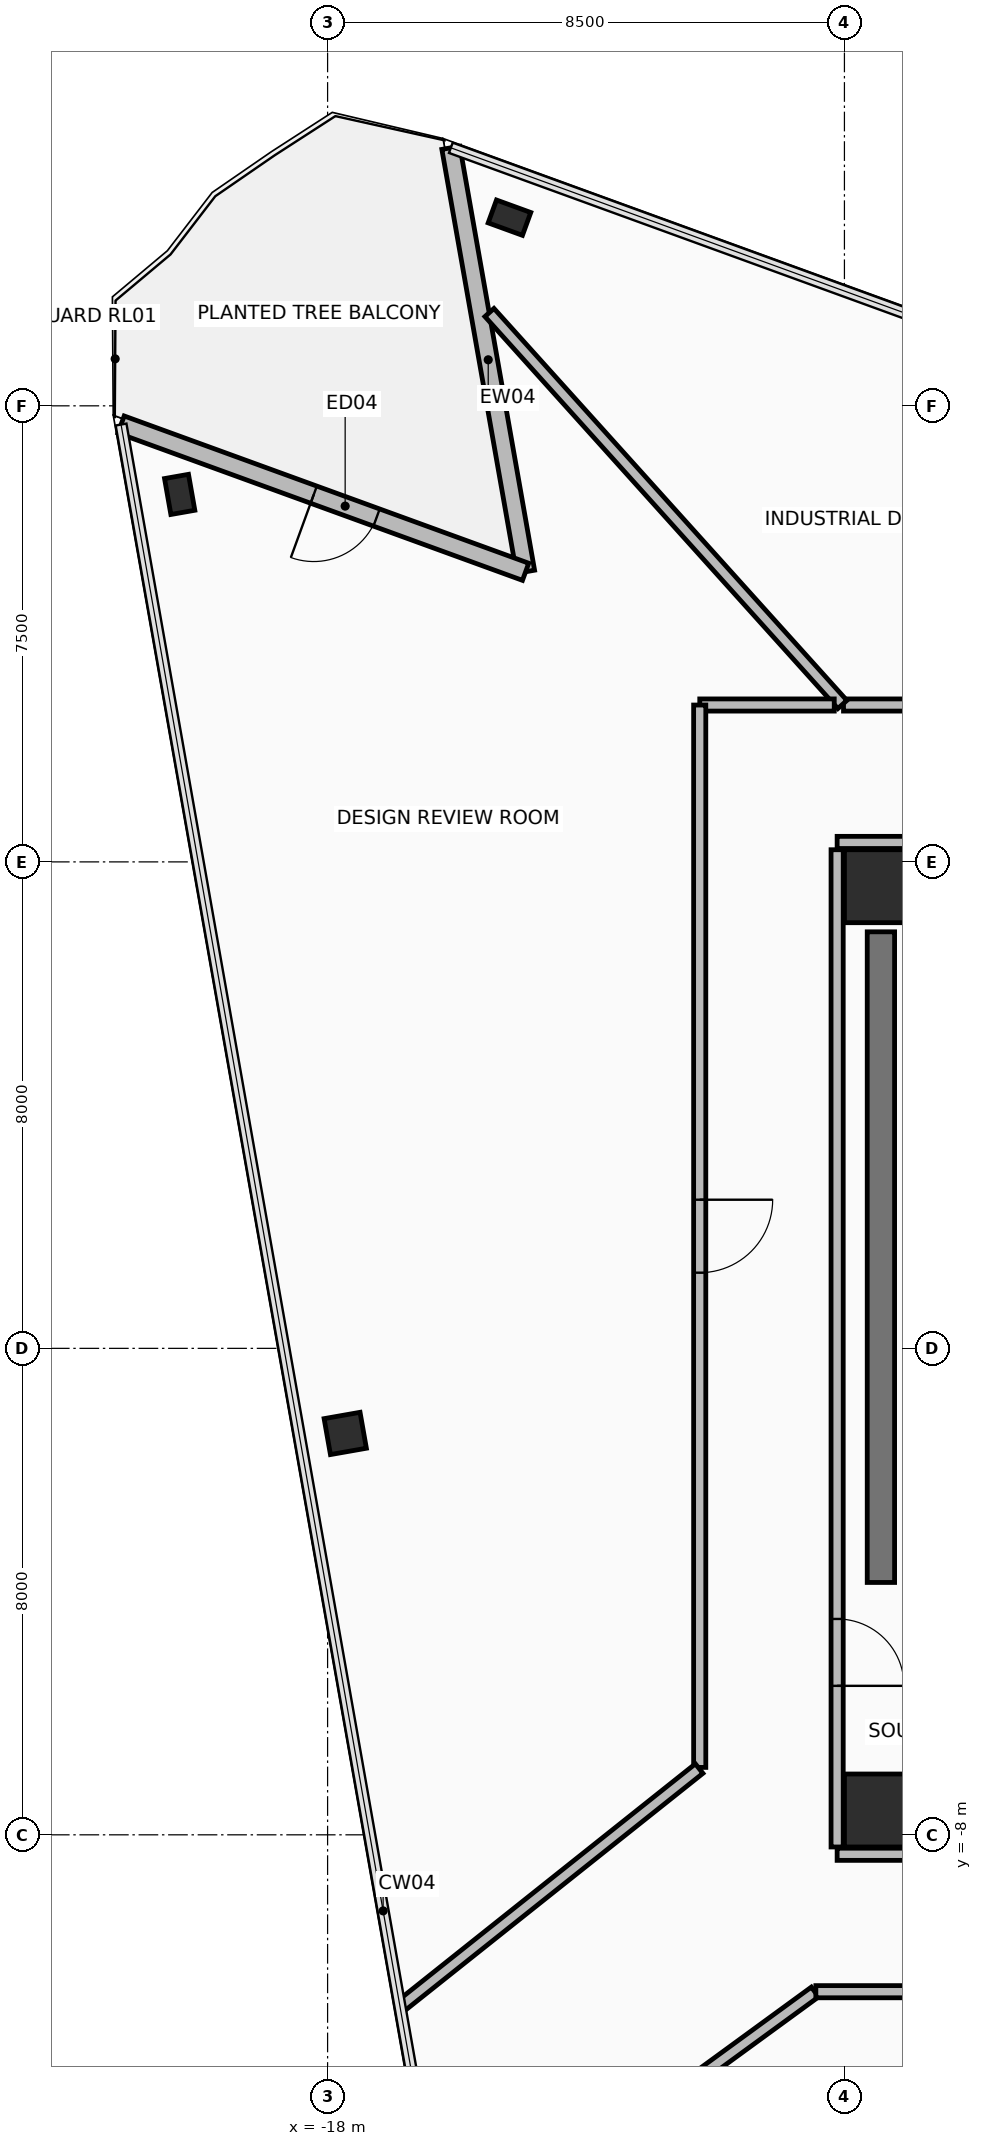
"""IFC4 building model, lengths in metres.
Left out: names, types, materials, properties, quantities, classifications, styles, units other than length and angle.
Written with IfcOpenShell. Run it as: python <this file> out.ifc"""

import sys

from ifc_helpers import new_model, si_unit, direction, frame, frame_2d, origin, origin_2d, place, context, subcontext, project, spatial, rectangle, hollow_rectangle, extrude, element, fill, save


model = new_model("IFC4")
c1 = context("Model", 3, precision=1e-05, world=origin(), true_north=direction((0.0, 1.0)))
c2 = subcontext(c1, "Body", "Model", "MODEL_VIEW")
j1 = project(units=[si_unit("LENGTHUNIT", "METRE"), si_unit("PLANEANGLEUNIT", "RADIAN")], contexts=[c1])
p1 = place(None, origin())
s1 = spatial("IfcSite", under=j1, at=p1, CompositionType="ELEMENT")
p2 = place(p1, origin())
s2 = spatial("IfcBuilding", under=s1, at=p2, CompositionType="ELEMENT")
p3 = place(p2, frame((0.0, 0.0, 192.1)))
s3 = spatial("IfcBuildingStorey", under=s2, at=p3, CompositionType="ELEMENT", Elevation=192.1)
for number, where, z_axis, x_axis in (
    (1, (-8.9, -7.6, 0.0), (0.0, 0.0, 1.0), (1.0, 0.0, 0.0)),
    (2, (-8.9, 7.6, 0.0), (0.0, 0.0, 1.0), (1.0, 0.0, 0.0)),
):
    element("IfcColumn", number, at=place(p3, frame(where, z_axis=z_axis, x_axis=x_axis)), inside=s3, PredefinedType="COLUMN", context=c2, shape_type="SweptSolid", body=[
        extrude(rectangle(XDim=1.2, YDim=1.2, at=origin_2d()), origin(), (0.0, 0.0, 1.0), 4.75),
    ])
p4 = place(p3, frame((-20.433, 14.043, 0.0), z_axis=(0.0, 0.0, 1.0), x_axis=(-0.173648177667, 0.984807753012, 0.0)))
e3 = element("IfcColumn", 3, at=p4, inside=s3, PredefinedType="COLUMN", context=c2, shape_type="SweptSolid", body=[
    extrude(hollow_rectangle(XDim=0.4, YDim=0.6, WallThickness=0.03, at=origin_2d()), origin(), (0.0, 0.0, 1.0), 4.75),
])
p5 = place(p3, frame((-17.71, -1.399, 0.0), z_axis=(0.0, 0.0, 1.0), x_axis=(-0.173648177667, 0.984807753012, 0.0)))
e4 = element("IfcColumn", 4, at=p5, inside=s3, PredefinedType="COLUMN", context=c2, shape_type="SweptSolid", body=[
    extrude(hollow_rectangle(XDim=0.6, YDim=0.6, WallThickness=0.036, at=origin_2d()), origin(), (0.0, 0.0, 1.0), 4.75),
])
p6 = place(p3, frame((-15.009, 18.594, 0.0), z_axis=(0.0, 0.0, 1.0), x_axis=(-0.939692023847, 0.342021783398, 0.0)))
e5 = element("IfcColumn", 5, at=p6, inside=s3, PredefinedType="COLUMN", context=c2, shape_type="SweptSolid", body=[
    extrude(hollow_rectangle(XDim=0.4, YDim=0.6, WallThickness=0.03, at=origin_2d()), origin(), (0.0, 0.0, 1.0), 4.75),
])
p7 = place(p3, frame((-15.973, 19.743, 0.0), z_axis=(0.0, 0.0, 1.0), x_axis=(0.173651569749, -0.984807154891, 0.0)))
e6 = element("IfcWall", 6, at=p7, inside=s3, PredefinedType="STANDARD", context=c2, shape_type="SweptSolid", body=[
    extrude(rectangle(XDim=7.08, YDim=0.3, at=frame_2d((3.54, 0.0))), origin(), (0.0, 0.0, 1.0), 2.255),
])
p8 = place(p3, frame((-14.744, 12.771, 0.0), z_axis=(0.0, 0.0, 1.0), x_axis=(-0.939687665182, 0.342033758429, 0.0)))
e7 = element("IfcWall", 7, at=p8, inside=s3, PredefinedType="STANDARD", context=c2, shape_type="SweptSolid", body=[
    extrude(rectangle(XDim=7.08, YDim=0.3, at=frame_2d((3.54, 0.0))), origin(), (0.0, 0.0, 1.0), 2.255),
])
p9 = place(p8, frame((2.608, 0.0, 0.0)))
e8 = element("IfcOpeningElement", 8, at=p9, cuts=e7, PredefinedType="OPENING", context=c2, shape_type="SweptSolid", body=[
    extrude(rectangle(XDim=1.1, YDim=2.2, at=frame_2d((0.55, 1.1))), frame((0.0, 0.16, 0.0), z_axis=(0.0, -1.0, 0.0), x_axis=(1.0, 0.0, 0.0)), (0.0, 0.0, 1.0), 0.32),
])
p10 = place(p3, frame((-8.9, -3.85, 0.0), z_axis=(0.0, 0.0, 1.0), x_axis=(0.0, 1.0, 0.0)))
e9 = element("IfcWall", 9, at=p10, inside=s3, PredefinedType="SHEAR", context=c2, shape_type="SweptSolid", body=[
    extrude(rectangle(XDim=10.7, YDim=0.45, at=frame_2d((5.35, 0.0))), origin(), (0.0, 0.0, 1.0), 4.56),
])
p11 = place(p3, frame((-9.62, -8.32, 0.0), z_axis=(0.0, 0.0, 1.0), x_axis=(1.0, 0.0, 0.0)))
e10 = element("IfcWall", 10, at=p11, inside=s3, PredefinedType="PARTITIONING", context=c2, shape_type="SweptSolid", body=[
    extrude(rectangle(XDim=19.24, YDim=0.2, at=frame_2d((9.62, 0.0))), origin(), (0.0, 0.0, 1.0), 2.355),
])
p12 = place(p11, frame((8.57, 0.0, 0.0)))
e11 = element("IfcOpeningElement", 11, at=p12, cuts=e10, PredefinedType="OPENING", context=c2, shape_type="SweptSolid", body=[
    extrude(rectangle(XDim=0.9, YDim=2.1, at=frame_2d((0.45, 1.05))), frame((0.0, 0.11, 0.0), z_axis=(0.0, -1.0, 0.0), x_axis=(1.0, 0.0, 0.0)), (0.0, 0.0, 1.0), 0.22),
])
p13 = place(p11, frame((14.045, 0.0, 0.0)))
e12 = element("IfcOpeningElement", 12, at=p13, cuts=e10, PredefinedType="OPENING", context=c2, shape_type="SweptSolid", body=[
    extrude(rectangle(XDim=0.9, YDim=2.1, at=frame_2d((0.45, 1.05))), frame((0.0, 0.11, 0.0), z_axis=(0.0, -1.0, 0.0), x_axis=(1.0, 0.0, 0.0)), (0.0, 0.0, 1.0), 0.22),
])
p14 = place(p11, frame((15.995, 0.0, 0.0)))
e13 = element("IfcOpeningElement", 13, at=p14, cuts=e10, PredefinedType="OPENING", context=c2, shape_type="SweptSolid", body=[
    extrude(rectangle(XDim=0.9, YDim=2.1, at=frame_2d((0.45, 1.05))), frame((0.0, 0.11, 0.0), z_axis=(0.0, -1.0, 0.0), x_axis=(1.0, 0.0, 0.0)), (0.0, 0.0, 1.0), 0.22),
])
p15 = place(p3, frame((9.62, 8.32, 0.0), z_axis=(0.0, 0.0, 1.0), x_axis=(-1.0, 0.0, 0.0)))
e14 = element("IfcWall", 14, at=p15, inside=s3, PredefinedType="PARTITIONING", context=c2, shape_type="SweptSolid", body=[
    extrude(rectangle(XDim=19.24, YDim=0.2, at=frame_2d((9.62, 0.0))), origin(), (0.0, 0.0, 1.0), 2.755),
])
p16 = place(p15, frame((15.745, 0.0, 0.0)))
e15 = element("IfcOpeningElement", 15, at=p16, cuts=e14, PredefinedType="OPENING", context=c2, shape_type="SweptSolid", body=[
    extrude(rectangle(XDim=0.9, YDim=2.1, at=frame_2d((0.45, 1.05))), frame((0.0, 0.11, 0.0), z_axis=(0.0, -1.0, 0.0), x_axis=(1.0, 0.0, 0.0)), (0.0, 0.0, 1.0), 0.22),
])
p17 = place(p15, frame((13.795, 0.0, 0.0)))
e16 = element("IfcOpeningElement", 16, at=p17, cuts=e14, PredefinedType="OPENING", context=c2, shape_type="SweptSolid", body=[
    extrude(rectangle(XDim=0.9, YDim=2.1, at=frame_2d((0.45, 1.05))), frame((0.0, 0.11, 0.0), z_axis=(0.0, -1.0, 0.0), x_axis=(1.0, 0.0, 0.0)), (0.0, 0.0, 1.0), 0.22),
])
p18 = place(p3, frame((-9.62, 8.2, 0.0), z_axis=(0.0, 0.0, 1.0), x_axis=(0.0, -1.0, 0.0)))
e17 = element("IfcWall", 17, at=p18, inside=s3, PredefinedType="PARTITIONING", context=c2, shape_type="SweptSolid", body=[
    extrude(rectangle(XDim=16.4, YDim=0.2, at=frame_2d((8.2, 0.0))), origin(), (0.0, 0.0, 1.0), 2.755),
])
p19 = place(p18, frame((12.65, 0.0, 0.0)))
e18 = element("IfcOpeningElement", 18, at=p19, cuts=e17, PredefinedType="OPENING", context=c2, shape_type="SweptSolid", body=[
    extrude(rectangle(XDim=1.1, YDim=2.15, at=frame_2d((0.55, 1.075))), frame((0.0, 0.11, 0.0), z_axis=(0.0, -1.0, 0.0), x_axis=(1.0, 0.0, 0.0)), (0.0, 0.0, 1.0), 0.22),
])
p20 = place(p3, frame((-16.069, -15.024, 0.0), z_axis=(0.0, 0.0, 1.0), x_axis=(0.807835167635, 0.589408467815, 0.0)))
e19 = element("IfcWall", 19, at=p20, inside=s3, PredefinedType="PARTITIONING", context=c2, shape_type="SweptSolid", body=[
    extrude(rectangle(XDim=7.531, YDim=0.2, at=frame_2d((3.766, 0.0))), origin(), (0.0, 0.0, 1.0), 2.255),
])
p21 = place(p3, frame((-9.97, -10.58, 0.0), z_axis=(0.0, 0.0, 1.0), x_axis=(1.0, 0.0, 0.0)))
e20 = element("IfcWall", 20, at=p21, inside=s3, PredefinedType="PARTITIONING", context=c2, shape_type="SweptSolid", body=[
    extrude(rectangle(XDim=16.567, YDim=0.2, at=frame_2d((8.284, 0.0))), origin(), (0.0, 0.0, 1.0), 2.355),
])
p22 = place(p21, frame((7.859, 0.0, 0.0)))
e21 = element("IfcOpeningElement", 21, at=p22, cuts=e20, PredefinedType="OPENING", context=c2, shape_type="SweptSolid", body=[
    extrude(rectangle(XDim=0.85, YDim=2.1, at=frame_2d((0.425, 1.05))), frame((0.0, 0.11, 0.0), z_axis=(0.0, -1.0, 0.0), x_axis=(1.0, 0.0, 0.0)), (0.0, 0.0, 1.0), 0.22),
])
p23 = place(p3, frame((9.203, 10.58, 0.0), z_axis=(0.0, 0.0, 1.0), x_axis=(-1.0, 0.0, 0.0)))
e22 = element("IfcWall", 22, at=p23, inside=s3, PredefinedType="PARTITIONING", context=c2, shape_type="SweptSolid", body=[
    extrude(rectangle(XDim=18.718, YDim=0.2, at=frame_2d((9.359, 0.0))), origin(), (0.0, 0.0, 1.0), 2.255),
])
p24 = place(p23, frame((8.859, 0.0, 0.0)))
e23 = element("IfcOpeningElement", 23, at=p24, cuts=e22, PredefinedType="OPENING", context=c2, shape_type="SweptSolid", body=[
    extrude(rectangle(XDim=1.0, YDim=2.15, at=frame_2d((0.5, 1.075))), frame((0.0, 0.11, 0.0), z_axis=(0.0, -1.0, 0.0), x_axis=(1.0, 0.0, 0.0)), (0.0, 0.0, 1.0), 0.22),
])
p25 = place(p3, frame((-9.534, 10.588, 0.0), z_axis=(0.0, 0.0, 1.0), x_axis=(-0.66914197802, 0.743134586231, 0.0)))
e24 = element("IfcWall", 24, at=p25, inside=s3, PredefinedType="PARTITIONING", context=c2, shape_type="SweptSolid", body=[
    extrude(rectangle(XDim=8.675, YDim=0.2, at=frame_2d((4.337, 0.0))), origin(), (0.0, 0.0, 1.0), 2.755),
])
p26 = place(p3, frame((-9.667, 10.58, 0.0), z_axis=(0.0, 0.0, 1.0), x_axis=(-1.0, 0.0, 0.0)))
e25 = element("IfcWall", 25, at=p26, inside=s3, PredefinedType="PARTITIONING", context=c2, shape_type="SweptSolid", body=[
    extrude(rectangle(XDim=2.212, YDim=0.2, at=frame_2d((1.106, 0.0))), origin(), (0.0, 0.0, 1.0), 2.755),
])
p27 = place(p3, frame((-11.88, 10.579, 0.0), z_axis=(0.0, 0.0, 1.0), x_axis=(0.0, -1.0, 0.0)))
e26 = element("IfcWall", 26, at=p27, inside=s3, PredefinedType="PARTITIONING", context=c2, shape_type="SweptSolid", body=[
    extrude(rectangle(XDim=17.471, YDim=0.2, at=frame_2d((8.735, 0.0))), origin(), (0.0, 0.0, 1.0), 2.755),
])
p28 = place(p27, frame((8.135, 0.0, 0.0)))
e27 = element("IfcOpeningElement", 27, at=p28, cuts=e26, PredefinedType="OPENING", context=c2, shape_type="SweptSolid", body=[
    extrude(rectangle(XDim=1.2, YDim=2.15, at=frame_2d((0.6, 1.075))), frame((0.0, 0.11, 0.0), z_axis=(0.0, -1.0, 0.0), x_axis=(1.0, 0.0, 0.0)), (0.0, 0.0, 1.0), 0.22),
])
p29 = place(p3, frame((-11.889, -6.911, 0.0), z_axis=(0.0, 0.0, 1.0), x_axis=(-0.782381746657, -0.622799167066, 0.0)))
e28 = element("IfcWall", 28, at=p29, inside=s3, PredefinedType="PARTITIONING", context=c2, shape_type="SweptSolid", body=[
    extrude(rectangle(XDim=6.288, YDim=0.2, at=frame_2d((3.144, 0.0))), origin(), (0.0, 0.0, 1.0), 2.255),
])
p30 = place(p9, frame((1.1, 0.0, 0.0), z_axis=(0.0, 0.0, 1.0), x_axis=(-1.0, 0.0, 0.0)))
e29 = element("IfcDoor", 29, at=p30, inside=s3, OperationType="SINGLE_SWING_LEFT", PredefinedType="DOOR", context=c2, shape_type="SweptSolid", body=[
    extrude(rectangle(XDim=1.1, YDim=2.2, at=frame_2d((0.55, 1.1))), frame((0.0, 0.025, 0.0), z_axis=(0.0, -1.0, 0.0), x_axis=(1.0, 0.0, 0.0)), (0.0, 0.0, 1.0), 0.05),
])
fill(e8, e29)
p31 = place(p19, frame((1.1, 0.0, 0.0), z_axis=(0.0, 0.0, 1.0), x_axis=(-1.0, 0.0, 0.0)))
e30 = element("IfcDoor", 30, at=p31, inside=s3, OperationType="SINGLE_SWING_LEFT", PredefinedType="DOOR", context=c2, shape_type="SweptSolid", body=[
    extrude(rectangle(XDim=1.1, YDim=2.15, at=frame_2d((0.55, 1.075))), frame((0.0, 0.025, 0.0), z_axis=(0.0, -1.0, 0.0), x_axis=(1.0, 0.0, 0.0)), (0.0, 0.0, 1.0), 0.05),
])
fill(e18, e30)
p32 = place(p28, origin())
e31 = element("IfcDoor", 31, at=p32, inside=s3, OperationType="SINGLE_SWING_LEFT", PredefinedType="DOOR", context=c2, shape_type="SweptSolid", body=[
    extrude(rectangle(XDim=1.2, YDim=2.15, at=frame_2d((0.6, 1.075))), frame((0.0, 0.025, 0.0), z_axis=(0.0, -1.0, 0.0), x_axis=(1.0, 0.0, 0.0)), (0.0, 0.0, 1.0), 0.05),
])
fill(e27, e31)
save(model, sys.argv[1])
